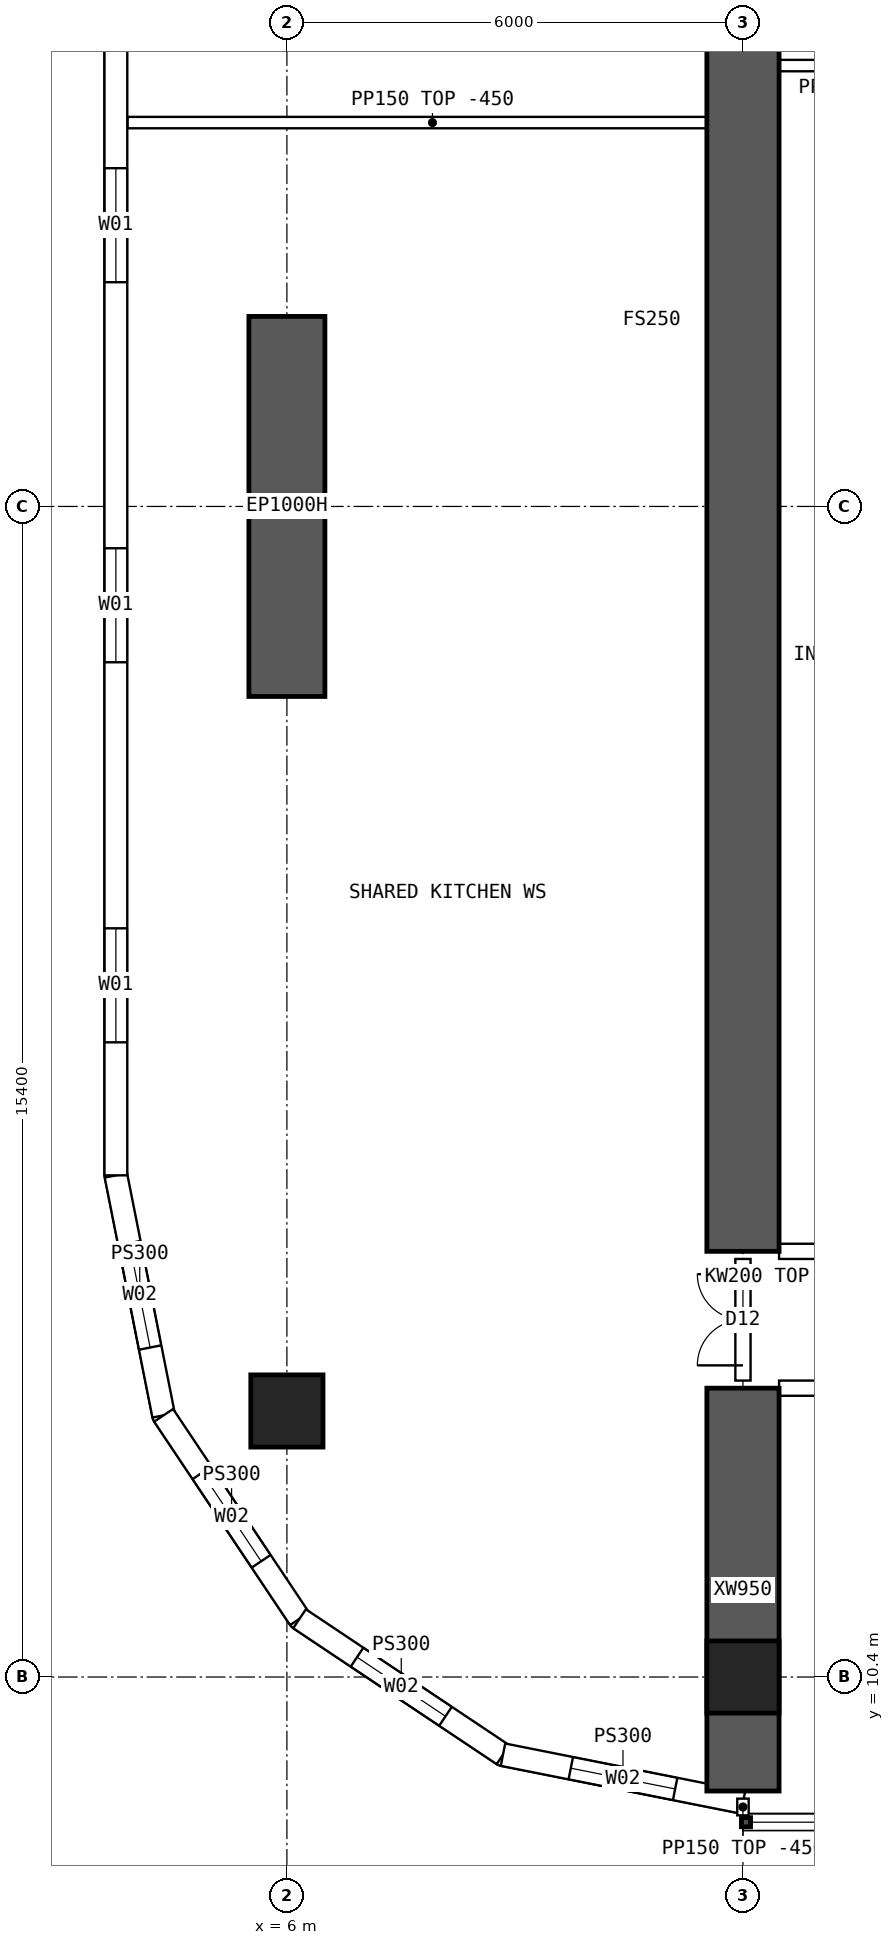
"""IFC4 building model, lengths in metres.
Left out: names, types, materials, properties, quantities, classifications, styles, units other than length and angle.
Written with IfcOpenShell. Run it as: python <this file> out.ifc"""

import sys

from ifc_helpers import new_model, si_unit, direction, frame, frame_2d, origin, origin_2d, place, context, subcontext, project, spatial, polyline, rectangle, hollow_rectangle, outline, extrude, element, fill, save


model = new_model("IFC4")
c1 = context("Model", 3, precision=1e-05, world=origin(), true_north=direction((0.0, 1.0)))
c2 = subcontext(c1, "Body", "Model", "MODEL_VIEW")
j1 = project(units=[si_unit("LENGTHUNIT", "METRE"), si_unit("PLANEANGLEUNIT", "RADIAN")], contexts=[c1])
p1 = place(None, origin())
s1 = spatial("IfcSite", under=j1, at=p1, CompositionType="ELEMENT")
p2 = place(p1, origin())
s2 = spatial("IfcBuilding", under=s1, at=p2, CompositionType="ELEMENT")
p3 = place(p2, frame((0.0, 0.0, 110.65)))
s3 = spatial("IfcBuildingStorey", under=s2, at=p3, CompositionType="ELEMENT", Elevation=110.65)
for number, where, z_axis, x_axis in (
    (1, (12.0, 10.4, 0.0), (0.0, 0.0, 1.0), (1.0, 0.0, 0.0)),
    (2, (6.0, 13.9, 0.0), (0.0, 0.0, 1.0), (1.0, 0.0, 0.0)),
):
    element("IfcColumn", number, at=place(p3, frame(where, z_axis=z_axis, x_axis=x_axis)), inside=s3, PredefinedType="COLUMN", context=c2, shape_type="SweptSolid", body=[
        extrude(hollow_rectangle(XDim=0.95, YDim=0.95, WallThickness=0.095, at=origin_2d()), origin(), (0.0, 0.0, 1.0), 3.75),
    ])
p4 = place(p3, frame((6.0, 23.3, 0.0), z_axis=(0.0, 0.0, 1.0), x_axis=(0.0, 1.0, 0.0)))
e3 = element("IfcWall", 3, at=p4, inside=s3, PredefinedType="SHEAR", context=c2, shape_type="SweptSolid", body=[
    extrude(rectangle(XDim=5.0, YDim=1.0, at=frame_2d((2.5, 0.0))), origin(), (0.0, 0.0, 1.0), 3.75),
])
p5 = place(p3, frame((12.0, 8.9, 0.0), z_axis=(0.0, 0.0, 1.0), x_axis=(0.0, 1.0, 0.0)))
e4 = element("IfcWall", 4, at=p5, inside=s3, PredefinedType="SHEAR", context=c2, shape_type="SweptSolid", body=[
    extrude(rectangle(XDim=5.3, YDim=0.95, at=frame_2d((2.65, 0.0))), origin(), (0.0, 0.0, 1.0), 3.75),
])
p6 = place(p3, frame((12.0, 16.0, 0.0), z_axis=(0.0, 0.0, 1.0), x_axis=(0.0, 1.0, 0.0)))
e5 = element("IfcWall", 5, at=p6, inside=s3, PredefinedType="SHEAR", context=c2, shape_type="SweptSolid", body=[
    extrude(rectangle(XDim=32.0, YDim=0.95, at=frame_2d((16.0, 0.0))), origin(), (0.0, 0.0, 1.0), 3.75),
])
p7 = place(p3, frame((3.75, 47.0, 0.0), z_axis=(0.0, 0.0, 1.0), x_axis=(0.0, -1.0, 0.0)))
e6 = element("IfcWall", 6, at=p7, inside=s3, PredefinedType="SOLIDWALL", context=c2, shape_type="SweptSolid", body=[
    extrude(outline(polyline([(-0.015, -0.15), (30.015, -0.15), (29.985, 0.15), (0.015, 0.15), (-0.015, -0.15)])), origin(), (0.0, 0.0, 1.0), 3.3),
])
p8 = place(p7, frame((1.75, 0.0, 0.9)))
e7 = element("IfcOpeningElement", 7, at=p8, cuts=e6, PredefinedType="OPENING", context=c2, shape_type="SweptSolid", body=[
    extrude(rectangle(XDim=1.5, YDim=2.0, at=frame_2d((0.75, 1.0))), frame((0.0, 0.16, 0.0), z_axis=(0.0, -1.0, 0.0), x_axis=(1.0, 0.0, 0.0)), (0.0, 0.0, 1.0), 0.32),
])
p9 = place(p7, frame((6.75, 0.0, 0.9)))
e8 = element("IfcOpeningElement", 8, at=p9, cuts=e6, PredefinedType="OPENING", context=c2, shape_type="SweptSolid", body=[
    extrude(rectangle(XDim=1.5, YDim=2.0, at=frame_2d((0.75, 1.0))), frame((0.0, 0.16, 0.0), z_axis=(0.0, -1.0, 0.0), x_axis=(1.0, 0.0, 0.0)), (0.0, 0.0, 1.0), 0.32),
])
p10 = place(p7, frame((11.75, 0.0, 0.9)))
e9 = element("IfcOpeningElement", 9, at=p10, cuts=e6, PredefinedType="OPENING", context=c2, shape_type="SweptSolid", body=[
    extrude(rectangle(XDim=1.5, YDim=2.0, at=frame_2d((0.75, 1.0))), frame((0.0, 0.16, 0.0), z_axis=(0.0, -1.0, 0.0), x_axis=(1.0, 0.0, 0.0)), (0.0, 0.0, 1.0), 0.32),
])
p11 = place(p7, frame((16.75, 0.0, 0.9)))
e10 = element("IfcOpeningElement", 10, at=p11, cuts=e6, PredefinedType="OPENING", context=c2, shape_type="SweptSolid", body=[
    extrude(rectangle(XDim=1.5, YDim=2.0, at=frame_2d((0.75, 1.0))), frame((0.0, 0.16, 0.0), z_axis=(0.0, -1.0, 0.0), x_axis=(1.0, 0.0, 0.0)), (0.0, 0.0, 1.0), 0.32),
])
p12 = place(p7, frame((21.75, 0.0, 0.9)))
e11 = element("IfcOpeningElement", 11, at=p12, cuts=e6, PredefinedType="OPENING", context=c2, shape_type="SweptSolid", body=[
    extrude(rectangle(XDim=1.5, YDim=2.0, at=frame_2d((0.75, 1.0))), frame((0.0, 0.16, 0.0), z_axis=(0.0, -1.0, 0.0), x_axis=(1.0, 0.0, 0.0)), (0.0, 0.0, 1.0), 0.32),
])
p13 = place(p7, frame((26.75, 0.0, 0.9)))
e12 = element("IfcOpeningElement", 12, at=p13, cuts=e6, PredefinedType="OPENING", context=c2, shape_type="SweptSolid", body=[
    extrude(rectangle(XDim=1.5, YDim=2.0, at=frame_2d((0.75, 1.0))), frame((0.0, 0.16, 0.0), z_axis=(0.0, -1.0, 0.0), x_axis=(1.0, 0.0, 0.0)), (0.0, 0.0, 1.0), 0.32),
])
p14 = place(p3, frame((3.75, 17.0, 0.0), z_axis=(0.0, 0.0, 1.0), x_axis=(0.195080412259, -0.980787251524, 0.0)))
e13 = element("IfcWall", 13, at=p14, inside=s3, PredefinedType="SOLIDWALL", context=c2, shape_type="SweptSolid", body=[
    extrude(outline(polyline([(-0.015, -0.15), (3.249, -0.15), (3.189, 0.15), (0.015, 0.15), (-0.015, -0.15)])), origin(), (0.0, 0.0, 1.0), 3.3),
])
p15 = place(p14, frame((0.909, 0.0, 0.9)))
e14 = element("IfcOpeningElement", 14, at=p15, cuts=e13, PredefinedType="OPENING", context=c2, shape_type="SweptSolid", body=[
    extrude(rectangle(XDim=1.4, YDim=1.8, at=frame_2d((0.7, 0.9))), frame((0.0, 0.16, 0.0), z_axis=(0.0, -1.0, 0.0), x_axis=(1.0, 0.0, 0.0)), (0.0, 0.0, 1.0), 0.32),
])
p16 = place(p3, frame((4.378, 13.843, 0.0), z_axis=(0.0, 0.0, 1.0), x_axis=(0.555609954424, -0.831443069936, 0.0)))
e15 = element("IfcWall", 15, at=p16, inside=s3, PredefinedType="SOLIDWALL", context=c2, shape_type="SweptSolid", body=[
    extrude(outline(polyline([(-0.03, -0.15), (3.249, -0.15), (3.189, 0.15), (0.03, 0.15), (-0.03, -0.15)])), origin(), (0.0, 0.0, 1.0), 3.3),
])
p17 = place(p16, frame((0.909, 0.0, 0.9)))
e16 = element("IfcOpeningElement", 16, at=p17, cuts=e15, PredefinedType="OPENING", context=c2, shape_type="SweptSolid", body=[
    extrude(rectangle(XDim=1.4, YDim=1.8, at=frame_2d((0.7, 0.9))), frame((0.0, 0.16, 0.0), z_axis=(0.0, -1.0, 0.0), x_axis=(1.0, 0.0, 0.0)), (0.0, 0.0, 1.0), 0.32),
])
p18 = place(p3, frame((6.167, 11.167, 0.0), z_axis=(0.0, 0.0, 1.0), x_axis=(0.831443069936, -0.555609954424, 0.0)))
e17 = element("IfcWall", 17, at=p18, inside=s3, PredefinedType="SOLIDWALL", context=c2, shape_type="SweptSolid", body=[
    extrude(outline(polyline([(-0.03, -0.15), (3.249, -0.15), (3.189, 0.15), (0.03, 0.15), (-0.03, -0.15)])), origin(), (0.0, 0.0, 1.0), 3.3),
])
p19 = place(p18, frame((0.909, 0.0, 0.9)))
e18 = element("IfcOpeningElement", 18, at=p19, cuts=e17, PredefinedType="OPENING", context=c2, shape_type="SweptSolid", body=[
    extrude(rectangle(XDim=1.4, YDim=1.8, at=frame_2d((0.7, 0.9))), frame((0.0, 0.16, 0.0), z_axis=(0.0, -1.0, 0.0), x_axis=(1.0, 0.0, 0.0)), (0.0, 0.0, 1.0), 0.32),
])
p20 = place(p3, frame((8.843, 9.378, 0.0), z_axis=(0.0, 0.0, 1.0), x_axis=(0.980787251524, -0.195080412259, 0.0)))
e19 = element("IfcWall", 19, at=p20, inside=s3, PredefinedType="SOLIDWALL", context=c2, shape_type="SweptSolid", body=[
    extrude(outline(polyline([(-0.03, -0.15), (3.249, -0.15), (3.189, 0.15), (0.03, 0.15), (-0.03, -0.15)])), origin(), (0.0, 0.0, 1.0), 3.3),
])
p21 = place(p20, frame((0.909, 0.0, 0.9)))
e20 = element("IfcOpeningElement", 20, at=p21, cuts=e19, PredefinedType="OPENING", context=c2, shape_type="SweptSolid", body=[
    extrude(rectangle(XDim=1.4, YDim=1.8, at=frame_2d((0.7, 0.9))), frame((0.0, 0.16, 0.0), z_axis=(0.0, -1.0, 0.0), x_axis=(1.0, 0.0, 0.0)), (0.0, 0.0, 1.0), 0.32),
])
p22 = place(p3, frame((12.475, 14.2, 0.0), z_axis=(0.0, 0.0, 1.0), x_axis=(1.0, 0.0, 0.0)))
e21 = element("IfcWall", 21, at=p22, inside=s3, PredefinedType="SOLIDWALL", context=c2, shape_type="SweptSolid", body=[
    extrude(outline(polyline([(0.0, 0.0), (5.05, 0.0), (5.05, 2.9), (0.0, 2.9), (0.0, 0.0)])), frame((0.0, 0.1, 0.0), z_axis=(0.0, -1.0, 0.0), x_axis=(1.0, 0.0, 0.0)), (0.0, 0.0, 1.0), 0.2),
])
p23 = place(p22, frame((0.6, 0.0, 0.0)))
e22 = element("IfcOpeningElement", 22, at=p23, cuts=e21, PredefinedType="OPENING", context=c2, shape_type="SweptSolid", body=[
    extrude(rectangle(XDim=1.0, YDim=2.1, at=frame_2d((0.5, 1.05))), frame((0.0, 0.11, 0.0), z_axis=(0.0, -1.0, 0.0), x_axis=(1.0, 0.0, 0.0)), (0.0, 0.0, 1.0), 0.22),
])
p24 = place(p3, frame((12.475, 16.0, 0.0), z_axis=(0.0, 0.0, 1.0), x_axis=(1.0, 0.0, 0.0)))
e23 = element("IfcWall", 23, at=p24, inside=s3, PredefinedType="SOLIDWALL", context=c2, shape_type="SweptSolid", body=[
    extrude(rectangle(XDim=5.05, YDim=0.2, at=frame_2d((2.525, 0.0))), origin(), (0.0, 0.0, 1.0), 3.3),
])
p25 = place(p24, frame((3.325, 0.0, 0.0)))
e24 = element("IfcOpeningElement", 24, at=p25, cuts=e23, PredefinedType="OPENING", context=c2, shape_type="SweptSolid", body=[
    extrude(rectangle(XDim=1.6, YDim=2.1, at=frame_2d((0.8, 1.05))), frame((0.0, 0.11, 0.0), z_axis=(0.0, -1.0, 0.0), x_axis=(1.0, 0.0, 0.0)), (0.0, 0.0, 1.0), 0.22),
])
p26 = place(p3, frame((12.0, 31.6, 0.0), z_axis=(0.0, 0.0, 1.0), x_axis=(1.0, 0.0, 0.0)))
e25 = element("IfcWall", 25, at=p26, inside=s3, PredefinedType="PARTITIONING", context=c2, shape_type="SweptSolid", body=[
    extrude(rectangle(XDim=3.6, YDim=0.15, at=frame_2d((1.8, 0.0))), origin(), (0.0, 0.0, 1.0), 3.3),
])
p27 = place(p3, frame((3.905, 30.85, 0.0), z_axis=(0.0, 0.0, 1.0), x_axis=(1.0, 0.0, 0.0)))
e26 = element("IfcWall", 26, at=p27, inside=s3, PredefinedType="PARTITIONING", context=c2, shape_type="SweptSolid", body=[
    extrude(outline(polyline([(0.0, 0.0), (8.02, 0.0), (8.02, 3.3), (2.397, 3.3), (2.395, 2.85), (1.797, 2.85), (1.795, 3.3), (0.0, 3.3), (0.0, 0.0)])), frame((0.0, 0.075, 0.0), z_axis=(0.0, -1.0, 0.0), x_axis=(1.0, 0.0, 0.0)), (0.0, 0.0, 1.0), 0.15),
])
p28 = place(p3, frame((12.0, 14.3, 0.0), z_axis=(0.0, 0.0, 1.0), x_axis=(0.0, 1.0, 0.0)))
e27 = element("IfcWall", 27, at=p28, inside=s3, PredefinedType="SOLIDWALL", context=c2, shape_type="SweptSolid", body=[
    extrude(outline(polyline([(0.0, 0.0), (1.6, 0.0), (1.6, 2.9), (0.0, 2.9), (0.0, 0.0)])), frame((0.0, 0.1, 0.0), z_axis=(0.0, -1.0, 0.0), x_axis=(1.0, 0.0, 0.0)), (0.0, 0.0, 1.0), 0.2),
])
p29 = place(p28, frame((0.2, 0.0, 0.0)))
e28 = element("IfcOpeningElement", 28, at=p29, cuts=e27, PredefinedType="OPENING", context=c2, shape_type="SweptSolid", body=[
    extrude(rectangle(XDim=1.2, YDim=2.1, at=frame_2d((0.6, 1.05))), frame((0.0, 0.11, 0.0), z_axis=(0.0, -1.0, 0.0), x_axis=(1.0, 0.0, 0.0)), (0.0, 0.0, 1.0), 0.22),
])
p30 = place(p3, frame((12.0, 8.8, 0.0), z_axis=(0.0, 0.0, 1.0), x_axis=(0.0, -1.0, 0.0)))
e29 = element("IfcWall", 29, at=p30, inside=s3, PredefinedType="PARTITIONING", context=c2, shape_type="SweptSolid", body=[
    extrude(rectangle(XDim=0.22, YDim=0.15, at=frame_2d((0.11, 0.0))), origin(), (0.0, 0.0, 1.0), 3.3),
])
p31 = place(p11, origin())
e30 = element("IfcWindow", 30, at=p31, inside=s3, PartitioningType="SINGLE_PANEL", PredefinedType="WINDOW", context=c2, shape_type="SweptSolid", body=[
    extrude(rectangle(XDim=1.5, YDim=2.0, at=frame_2d((0.75, 1.0))), frame((0.0, 0.03, 0.0), z_axis=(0.0, -1.0, 0.0), x_axis=(1.0, 0.0, 0.0)), (0.0, 0.0, 1.0), 0.06),
])
fill(e10, e30)
p32 = place(p12, origin())
e31 = element("IfcWindow", 31, at=p32, inside=s3, PartitioningType="SINGLE_PANEL", PredefinedType="WINDOW", context=c2, shape_type="SweptSolid", body=[
    extrude(rectangle(XDim=1.5, YDim=2.0, at=frame_2d((0.75, 1.0))), frame((0.0, 0.03, 0.0), z_axis=(0.0, -1.0, 0.0), x_axis=(1.0, 0.0, 0.0)), (0.0, 0.0, 1.0), 0.06),
])
fill(e11, e31)
p33 = place(p13, origin())
e32 = element("IfcWindow", 32, at=p33, inside=s3, PartitioningType="SINGLE_PANEL", PredefinedType="WINDOW", context=c2, shape_type="SweptSolid", body=[
    extrude(rectangle(XDim=1.5, YDim=2.0, at=frame_2d((0.75, 1.0))), frame((0.0, 0.03, 0.0), z_axis=(0.0, -1.0, 0.0), x_axis=(1.0, 0.0, 0.0)), (0.0, 0.0, 1.0), 0.06),
])
fill(e12, e32)
p34 = place(p15, origin())
e33 = element("IfcWindow", 33, at=p34, inside=s3, PartitioningType="SINGLE_PANEL", PredefinedType="WINDOW", context=c2, shape_type="SweptSolid", body=[
    extrude(rectangle(XDim=1.4, YDim=1.8, at=frame_2d((0.7, 0.9))), frame((0.0, 0.03, 0.0), z_axis=(0.0, -1.0, 0.0), x_axis=(1.0, 0.0, 0.0)), (0.0, 0.0, 1.0), 0.06),
])
fill(e14, e33)
p35 = place(p17, origin())
e34 = element("IfcWindow", 34, at=p35, inside=s3, PartitioningType="SINGLE_PANEL", PredefinedType="WINDOW", context=c2, shape_type="SweptSolid", body=[
    extrude(rectangle(XDim=1.4, YDim=1.8, at=frame_2d((0.7, 0.9))), frame((0.0, 0.03, 0.0), z_axis=(0.0, -1.0, 0.0), x_axis=(1.0, 0.0, 0.0)), (0.0, 0.0, 1.0), 0.06),
])
fill(e16, e34)
p36 = place(p19, origin())
e35 = element("IfcWindow", 35, at=p36, inside=s3, PartitioningType="SINGLE_PANEL", PredefinedType="WINDOW", context=c2, shape_type="SweptSolid", body=[
    extrude(rectangle(XDim=1.4, YDim=1.8, at=frame_2d((0.7, 0.9))), frame((0.0, 0.03, 0.0), z_axis=(0.0, -1.0, 0.0), x_axis=(1.0, 0.0, 0.0)), (0.0, 0.0, 1.0), 0.06),
])
fill(e18, e35)
p37 = place(p21, origin())
e36 = element("IfcWindow", 36, at=p37, inside=s3, PartitioningType="SINGLE_PANEL", PredefinedType="WINDOW", context=c2, shape_type="SweptSolid", body=[
    extrude(rectangle(XDim=1.4, YDim=1.8, at=frame_2d((0.7, 0.9))), frame((0.0, 0.03, 0.0), z_axis=(0.0, -1.0, 0.0), x_axis=(1.0, 0.0, 0.0)), (0.0, 0.0, 1.0), 0.06),
])
fill(e20, e36)
p38 = place(p29, origin())
e37 = element("IfcDoor", 37, at=p38, inside=s3, OperationType="DOUBLE_DOOR_SINGLE_SWING", PredefinedType="DOOR", context=c2, shape_type="SweptSolid", body=[
    extrude(rectangle(XDim=1.2, YDim=2.1, at=frame_2d((0.6, 1.05))), frame((0.0, 0.025, 0.0), z_axis=(0.0, -1.0, 0.0), x_axis=(1.0, 0.0, 0.0)), (0.0, 0.0, 1.0), 0.05),
])
fill(e28, e37)
save(model, sys.argv[1])
